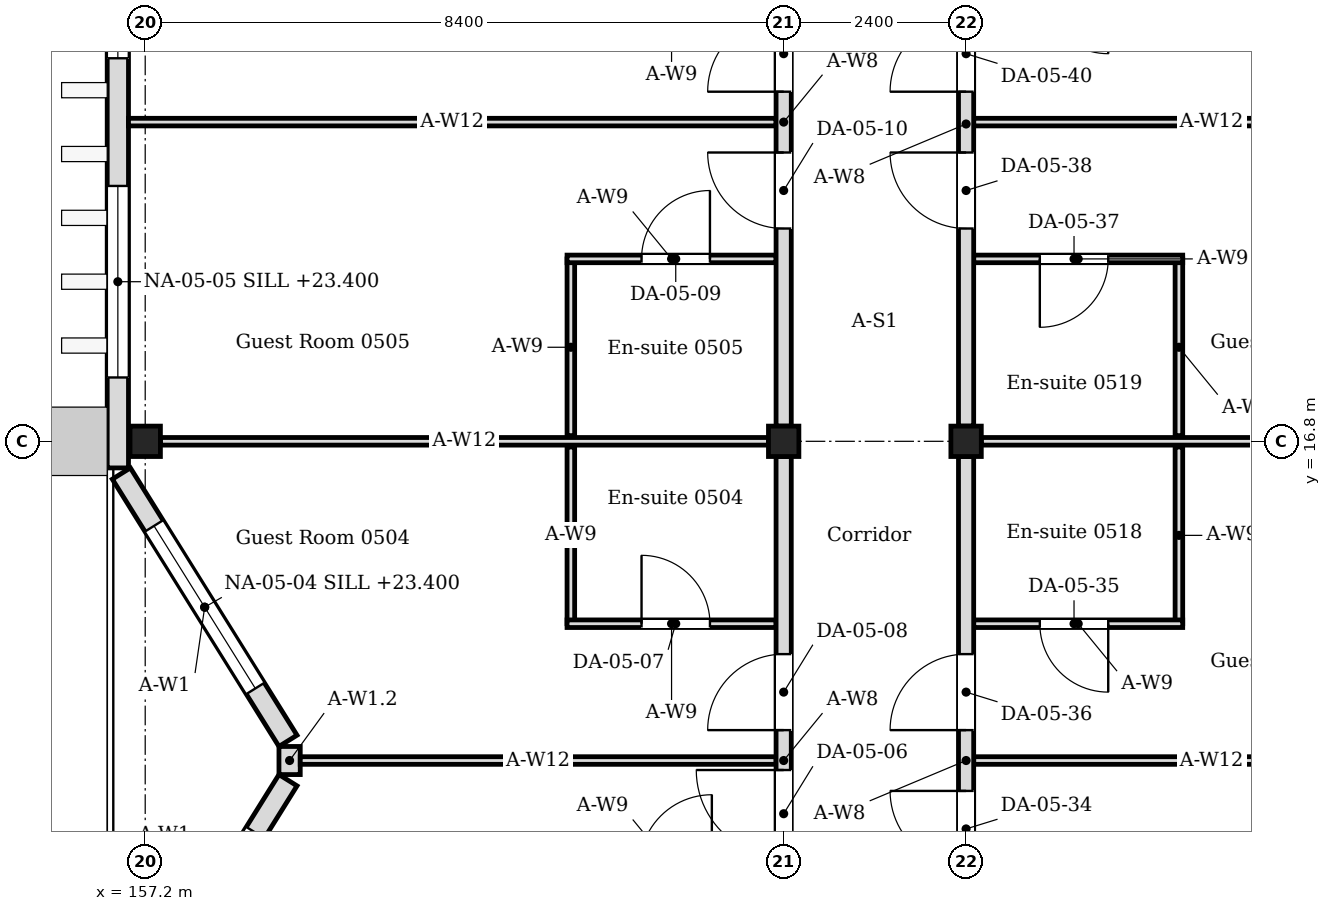
"""IFC4 building model, lengths in metres.
Left out: names, types, materials, properties, quantities, classifications, styles, units other than length and angle.
Written with IfcOpenShell. Run it as: python <this file> out.ifc"""

import sys

from ifc_helpers import new_model, si_unit, direction, frame, frame_2d, origin, origin_2d, place, context, subcontext, project, spatial, rectangle, i_section, extrude, element, fill, save


model = new_model("IFC4")
c1 = context("Model", 3, precision=1e-05, world=origin(), true_north=direction((0.0, 1.0)))
c2 = subcontext(c1, "Body", "Model", "MODEL_VIEW")
j1 = project(units=[si_unit("LENGTHUNIT", "METRE"), si_unit("PLANEANGLEUNIT", "RADIAN")], contexts=[c1])
p1 = place(None, origin())
s1 = spatial("IfcSite", under=j1, at=p1, CompositionType="ELEMENT")
p2 = place(p1, origin())
s2 = spatial("IfcBuilding", under=s1, at=p2, CompositionType="ELEMENT")
p3 = place(p2, frame((0.0, 0.0, 22.8)))
s3 = spatial("IfcBuildingStorey", under=s2, at=p3, CompositionType="ELEMENT", Elevation=22.8)
for number, where, z_axis, x_axis in (
    (1, (157.2, 16.8, 0.0), (0.0, 0.0, 1.0), (1.0, 0.0, 0.0)),
    (2, (165.6, 16.8, 0.0), (0.0, 0.0, 1.0), (1.0, 0.0, 0.0)),
    (3, (168.0, 16.8, 0.0), (0.0, 0.0, 1.0), (1.0, 0.0, 0.0)),
):
    element("IfcColumn", number, at=place(p3, frame(where, z_axis=z_axis, x_axis=x_axis)), inside=s3, PredefinedType="COLUMN", context=c2, shape_type="SweptSolid", body=[
        extrude(i_section(OverallWidth=0.4, OverallDepth=0.4, WebThickness=0.013, FlangeThickness=0.021, FilletRadius=0.022, at=origin_2d()), origin(), (0.0, 0.0, 1.0), 4.2),
    ])
p4 = place(p3, frame((156.886, 8.824, 0.0), z_axis=(0.0, 0.0, 1.0), x_axis=(0.529018946142, 0.848610013271, 0.0)))
e4 = element("IfcWall", 4, at=p4, inside=s3, PredefinedType="SOLIDWALL", context=c2, shape_type="SweptSolid", body=[
    extrude(rectangle(XDim=4.144, YDim=0.28, at=frame_2d((2.072, 0.0))), origin(), (0.0, 0.0, 1.0), 4.05),
])
p5 = place(p4, frame((0.812, 0.0, 0.45)))
e5 = element("IfcOpeningElement", 5, at=p5, cuts=e4, PredefinedType="OPENING", context=c2, shape_type="SweptSolid", body=[
    extrude(rectangle(XDim=2.52, YDim=2.1, at=frame_2d((1.26, 1.05))), frame((0.0, 0.15, 0.0), z_axis=(0.0, -1.0, 0.0), x_axis=(1.0, 0.0, 0.0)), (0.0, 0.0, 1.0), 0.3),
])
p6 = place(p3, frame((159.079, 12.859, 0.0), z_axis=(0.0, 0.0, 1.0), x_axis=(-0.528992500338, 0.848626498871, 0.0)))
e6 = element("IfcWall", 6, at=p6, inside=s3, PredefinedType="SOLIDWALL", context=c2, shape_type="SweptSolid", body=[
    extrude(rectangle(XDim=4.145, YDim=0.28, at=frame_2d((2.072, 0.0))), origin(), (0.0, 0.0, 1.0), 4.05),
])
p7 = place(p6, frame((0.812, 0.0, 0.6)))
e7 = element("IfcOpeningElement", 7, at=p7, cuts=e6, PredefinedType="OPENING", context=c2, shape_type="SweptSolid", body=[
    extrude(rectangle(XDim=2.52, YDim=2.4, at=frame_2d((1.26, 1.2))), frame((0.0, 0.15, 0.0), z_axis=(0.0, -1.0, 0.0), x_axis=(1.0, 0.0, 0.0)), (0.0, 0.0, 1.0), 0.3),
])
p8 = place(p3, frame((159.1, 12.415, 0.0), z_axis=(0.0, 0.0, 1.0), x_axis=(0.0, 1.0, 0.0)))
e8 = element("IfcWall", 8, at=p8, inside=s3, PredefinedType="SOLIDWALL", context=c2, shape_type="SweptSolid", body=[
    extrude(rectangle(XDim=0.37, YDim=0.28, at=frame_2d((0.185, 0.0))), origin(), (0.0, 0.0, 1.0), 3.604),
])
p9 = place(p3, frame((156.84, 16.45, 0.0), z_axis=(0.0, 0.0, 1.0), x_axis=(0.0, 1.0, 0.0)))
e9 = element("IfcWall", 9, at=p9, inside=s3, PredefinedType="SOLIDWALL", context=c2, shape_type="SweptSolid", body=[
    extrude(rectangle(XDim=25.9, YDim=0.28, at=frame_2d((12.95, 0.0))), origin(), (0.0, 0.0, 1.0), 4.05),
])
p10 = place(p9, frame((1.19, 0.0, 0.6)))
e10 = element("IfcOpeningElement", 10, at=p10, cuts=e9, PredefinedType="OPENING", context=c2, shape_type="SweptSolid", body=[
    extrude(rectangle(XDim=2.52, YDim=2.4, at=frame_2d((1.26, 1.2))), frame((0.0, 0.15, 0.0), z_axis=(0.0, -1.0, 0.0), x_axis=(1.0, 0.0, 0.0)), (0.0, 0.0, 1.0), 0.3),
])
p11 = place(p9, frame((5.39, 0.0, 0.6)))
e11 = element("IfcOpeningElement", 11, at=p11, cuts=e9, PredefinedType="OPENING", context=c2, shape_type="SweptSolid", body=[
    extrude(rectangle(XDim=2.52, YDim=2.4, at=frame_2d((1.26, 1.2))), frame((0.0, 0.15, 0.0), z_axis=(0.0, -1.0, 0.0), x_axis=(1.0, 0.0, 0.0)), (0.0, 0.0, 1.0), 0.3),
])
p12 = place(p9, frame((9.17, 0.0, 0.6)))
e12 = element("IfcOpeningElement", 12, at=p12, cuts=e9, PredefinedType="OPENING", context=c2, shape_type="SweptSolid", body=[
    extrude(rectangle(XDim=2.52, YDim=2.4, at=frame_2d((1.26, 1.2))), frame((0.0, 0.15, 0.0), z_axis=(0.0, -1.0, 0.0), x_axis=(1.0, 0.0, 0.0)), (0.0, 0.0, 1.0), 0.3),
])
p13 = place(p9, frame((13.37, 0.0, 0.6)))
e13 = element("IfcOpeningElement", 13, at=p13, cuts=e9, PredefinedType="OPENING", context=c2, shape_type="SweptSolid", body=[
    extrude(rectangle(XDim=2.52, YDim=2.4, at=frame_2d((1.26, 1.2))), frame((0.0, 0.15, 0.0), z_axis=(0.0, -1.0, 0.0), x_axis=(1.0, 0.0, 0.0)), (0.0, 0.0, 1.0), 0.3),
])
p14 = place(p9, frame((17.57, 0.0, 0.6)))
e14 = element("IfcOpeningElement", 14, at=p14, cuts=e9, PredefinedType="OPENING", context=c2, shape_type="SweptSolid", body=[
    extrude(rectangle(XDim=2.52, YDim=2.4, at=frame_2d((1.26, 1.2))), frame((0.0, 0.15, 0.0), z_axis=(0.0, -1.0, 0.0), x_axis=(1.0, 0.0, 0.0)), (0.0, 0.0, 1.0), 0.3),
])
p15 = place(p9, frame((21.77, 0.0, 0.6)))
e15 = element("IfcOpeningElement", 15, at=p15, cuts=e9, PredefinedType="OPENING", context=c2, shape_type="SweptSolid", body=[
    extrude(rectangle(XDim=2.52, YDim=2.4, at=frame_2d((1.26, 1.2))), frame((0.0, 0.15, 0.0), z_axis=(0.0, -1.0, 0.0), x_axis=(1.0, 0.0, 0.0)), (0.0, 0.0, 1.0), 0.3),
])
p16 = place(p3, frame((162.8, 14.4, 0.0), z_axis=(0.0, 0.0, 1.0), x_axis=(0.0, 1.0, 0.0)))
e16 = element("IfcWall", 16, at=p16, inside=s3, PredefinedType="PARTITIONING", context=c2, shape_type="SweptSolid", body=[
    extrude(rectangle(XDim=2.325, YDim=0.1, at=frame_2d((1.163, 0.0))), origin(), (0.0, 0.0, 1.0), 4.05),
])
p17 = place(p3, frame((162.75, 14.4, 0.0), z_axis=(0.0, 0.0, 1.0), x_axis=(1.0, 0.0, 0.0)))
e17 = element("IfcWall", 17, at=p17, inside=s3, PredefinedType="PARTITIONING", context=c2, shape_type="SweptSolid", body=[
    extrude(rectangle(XDim=2.75, YDim=0.1, at=frame_2d((1.375, 0.0))), origin(), (0.0, 0.0, 1.0), 4.05),
])
p18 = place(p17, frame((0.98, 0.0, 0.0)))
e18 = element("IfcOpeningElement", 18, at=p18, cuts=e17, PredefinedType="OPENING", context=c2, shape_type="SweptSolid", body=[
    extrude(rectangle(XDim=0.9, YDim=2.1, at=frame_2d((0.45, 1.05))), frame((0.0, 0.06, 0.0), z_axis=(0.0, -1.0, 0.0), x_axis=(1.0, 0.0, 0.0)), (0.0, 0.0, 1.0), 0.12),
])
p19 = place(p3, frame((162.8, 16.875, 0.0), z_axis=(0.0, 0.0, 1.0), x_axis=(0.0, 1.0, 0.0)))
e19 = element("IfcWall", 19, at=p19, inside=s3, PredefinedType="PARTITIONING", context=c2, shape_type="SweptSolid", body=[
    extrude(rectangle(XDim=2.325, YDim=0.1, at=frame_2d((1.163, 0.0))), origin(), (0.0, 0.0, 1.0), 4.05),
])
p20 = place(p3, frame((162.75, 19.2, 0.0), z_axis=(0.0, 0.0, 1.0), x_axis=(1.0, 0.0, 0.0)))
e20 = element("IfcWall", 20, at=p20, inside=s3, PredefinedType="PARTITIONING", context=c2, shape_type="SweptSolid", body=[
    extrude(rectangle(XDim=2.75, YDim=0.1, at=frame_2d((1.375, 0.0))), origin(), (0.0, 0.0, 1.0), 4.05),
])
p21 = place(p20, frame((0.98, 0.0, 0.0)))
e21 = element("IfcOpeningElement", 21, at=p21, cuts=e20, PredefinedType="OPENING", context=c2, shape_type="SweptSolid", body=[
    extrude(rectangle(XDim=0.9, YDim=2.1, at=frame_2d((0.45, 1.05))), frame((0.0, 0.06, 0.0), z_axis=(0.0, -1.0, 0.0), x_axis=(1.0, 0.0, 0.0)), (0.0, 0.0, 1.0), 0.12),
])
p22 = place(p3, frame((170.8, 14.4, 0.0), z_axis=(0.0, 0.0, 1.0), x_axis=(0.0, 1.0, 0.0)))
e22 = element("IfcWall", 22, at=p22, inside=s3, PredefinedType="PARTITIONING", context=c2, shape_type="SweptSolid", body=[
    extrude(rectangle(XDim=2.325, YDim=0.1, at=frame_2d((1.163, 0.0))), origin(), (0.0, 0.0, 1.0), 4.05),
])
p23 = place(p3, frame((170.85, 14.4, 0.0), z_axis=(0.0, 0.0, 1.0), x_axis=(-1.0, 0.0, 0.0)))
e23 = element("IfcWall", 23, at=p23, inside=s3, PredefinedType="PARTITIONING", context=c2, shape_type="SweptSolid", body=[
    extrude(rectangle(XDim=2.75, YDim=0.1, at=frame_2d((1.375, 0.0))), origin(), (0.0, 0.0, 1.0), 4.05),
])
p24 = place(p23, frame((0.98, 0.0, 0.0)))
e24 = element("IfcOpeningElement", 24, at=p24, cuts=e23, PredefinedType="OPENING", context=c2, shape_type="SweptSolid", body=[
    extrude(rectangle(XDim=0.9, YDim=2.1, at=frame_2d((0.45, 1.05))), frame((0.0, 0.06, 0.0), z_axis=(0.0, -1.0, 0.0), x_axis=(1.0, 0.0, 0.0)), (0.0, 0.0, 1.0), 0.12),
])
p25 = place(p3, frame((170.8, 16.875, 0.0), z_axis=(0.0, 0.0, 1.0), x_axis=(0.0, 1.0, 0.0)))
e25 = element("IfcWall", 25, at=p25, inside=s3, PredefinedType="PARTITIONING", context=c2, shape_type="SweptSolid", body=[
    extrude(rectangle(XDim=2.325, YDim=0.1, at=frame_2d((1.163, 0.0))), origin(), (0.0, 0.0, 1.0), 4.05),
])
p26 = place(p3, frame((170.85, 19.2, 0.0), z_axis=(0.0, 0.0, 1.0), x_axis=(-1.0, 0.0, 0.0)))
e26 = element("IfcWall", 26, at=p26, inside=s3, PredefinedType="PARTITIONING", context=c2, shape_type="SweptSolid", body=[
    extrude(rectangle(XDim=2.75, YDim=0.1, at=frame_2d((1.375, 0.0))), origin(), (0.0, 0.0, 1.0), 4.05),
])
p27 = place(p26, frame((0.98, 0.0, 0.0)))
e27 = element("IfcOpeningElement", 27, at=p27, cuts=e26, PredefinedType="OPENING", context=c2, shape_type="SweptSolid", body=[
    extrude(rectangle(XDim=0.9, YDim=2.1, at=frame_2d((0.45, 1.05))), frame((0.0, 0.06, 0.0), z_axis=(0.0, -1.0, 0.0), x_axis=(1.0, 0.0, 0.0)), (0.0, 0.0, 1.0), 0.12),
])
for number, where, z_axis, x_axis in (
    (28, (157.4, 16.8, 0.0), (0.0, 0.0, 1.0), (1.0, 0.0, 0.0)),
    (29, (168.2, 16.8, 0.0), (0.0, 0.0, 1.0), (1.0, 0.0, 0.0)),
):
    element("IfcWall", number, at=place(p3, frame(where, z_axis=z_axis, x_axis=x_axis)), inside=s3, PredefinedType="PARTITIONING", context=c2, shape_type="SweptSolid", body=[
        extrude(rectangle(XDim=8.0, YDim=0.1, at=frame_2d((4.0, 0.0))), origin(), (0.0, 0.0, 1.0), 3.604),
    ])
p28 = place(p3, frame((159.24, 12.6, 0.0), z_axis=(0.0, 0.0, 1.0), x_axis=(1.0, 0.0, 0.0)))
e30 = element("IfcWall", 30, at=p28, inside=s3, PredefinedType="PARTITIONING", context=c2, shape_type="SweptSolid", body=[
    extrude(rectangle(XDim=6.26, YDim=0.1, at=frame_2d((3.13, 0.0))), origin(), (0.0, 0.0, 1.0), 3.604),
])
p29 = place(p3, frame((156.98, 21.0, 0.0), z_axis=(0.0, 0.0, 1.0), x_axis=(1.0, 0.0, 0.0)))
e31 = element("IfcWall", 31, at=p29, inside=s3, PredefinedType="PARTITIONING", context=c2, shape_type="SweptSolid", body=[
    extrude(rectangle(XDim=8.52, YDim=0.1, at=frame_2d((4.26, 0.0))), origin(), (0.0, 0.0, 1.0), 3.604),
])
for number, where, z_axis, x_axis in (
    (32, (168.1, 12.6, 0.0), (0.0, 0.0, 1.0), (1.0, 0.0, 0.0)),
    (33, (168.1, 21.0, 0.0), (0.0, 0.0, 1.0), (1.0, 0.0, 0.0)),
):
    element("IfcWall", number, at=place(p3, frame(where, z_axis=z_axis, x_axis=x_axis)), inside=s3, PredefinedType="PARTITIONING", context=c2, shape_type="SweptSolid", body=[
        extrude(rectangle(XDim=6.26, YDim=0.1, at=frame_2d((3.13, 0.0))), origin(), (0.0, 0.0, 1.0), 3.604),
    ])
p30 = place(p3, frame((165.6, 8.6, 0.0), z_axis=(0.0, 0.0, 1.0), x_axis=(0.0, 1.0, 0.0)))
e34 = element("IfcWall", 34, at=p30, inside=s3, PredefinedType="PARTITIONING", context=c2, shape_type="SweptSolid", body=[
    extrude(rectangle(XDim=8.0, YDim=0.2, at=frame_2d((4.0, 0.0))), origin(), (0.0, 0.0, 1.0), 3.45),
])
p31 = place(p30, frame((2.725, 0.0, 0.0)))
e35 = element("IfcOpeningElement", 35, at=p31, cuts=e34, PredefinedType="OPENING", context=c2, shape_type="SweptSolid", body=[
    extrude(rectangle(XDim=1.15, YDim=2.1, at=frame_2d((0.575, 1.05))), frame((0.0, 0.11, 0.0), z_axis=(0.0, -1.0, 0.0), x_axis=(1.0, 0.0, 0.0)), (0.0, 0.0, 1.0), 0.22),
])
p32 = place(p30, frame((4.4, 0.0, 0.0)))
e36 = element("IfcOpeningElement", 36, at=p32, cuts=e34, PredefinedType="OPENING", context=c2, shape_type="SweptSolid", body=[
    extrude(rectangle(XDim=1.0, YDim=2.4, at=frame_2d((0.5, 1.2))), frame((0.0, 0.11, 0.0), z_axis=(0.0, -1.0, 0.0), x_axis=(1.0, 0.0, 0.0)), (0.0, 0.0, 1.0), 0.22),
])
p33 = place(p3, frame((165.6, 17.0, 0.0), z_axis=(0.0, 0.0, 1.0), x_axis=(0.0, 1.0, 0.0)))
e37 = element("IfcWall", 37, at=p33, inside=s3, PredefinedType="PARTITIONING", context=c2, shape_type="SweptSolid", body=[
    extrude(rectangle(XDim=8.0, YDim=0.2, at=frame_2d((4.0, 0.0))), origin(), (0.0, 0.0, 1.0), 3.45),
])
p34 = place(p33, frame((2.6, 0.0, 0.0)))
e38 = element("IfcOpeningElement", 38, at=p34, cuts=e37, PredefinedType="OPENING", context=c2, shape_type="SweptSolid", body=[
    extrude(rectangle(XDim=1.0, YDim=2.4, at=frame_2d((0.5, 1.2))), frame((0.0, 0.11, 0.0), z_axis=(0.0, -1.0, 0.0), x_axis=(1.0, 0.0, 0.0)), (0.0, 0.0, 1.0), 0.22),
])
p35 = place(p33, frame((4.4, 0.0, 0.0)))
e39 = element("IfcOpeningElement", 39, at=p35, cuts=e37, PredefinedType="OPENING", context=c2, shape_type="SweptSolid", body=[
    extrude(rectangle(XDim=1.0, YDim=2.4, at=frame_2d((0.5, 1.2))), frame((0.0, 0.11, 0.0), z_axis=(0.0, -1.0, 0.0), x_axis=(1.0, 0.0, 0.0)), (0.0, 0.0, 1.0), 0.22),
])
p36 = place(p3, frame((168.0, 8.6, 0.0), z_axis=(0.0, 0.0, 1.0), x_axis=(0.0, 1.0, 0.0)))
e40 = element("IfcWall", 40, at=p36, inside=s3, PredefinedType="PARTITIONING", context=c2, shape_type="SweptSolid", body=[
    extrude(rectangle(XDim=8.0, YDim=0.2, at=frame_2d((4.0, 0.0))), origin(), (0.0, 0.0, 1.0), 3.45),
])
p37 = place(p36, frame((2.6, 0.0, 0.0)))
e41 = element("IfcOpeningElement", 41, at=p37, cuts=e40, PredefinedType="OPENING", context=c2, shape_type="SweptSolid", body=[
    extrude(rectangle(XDim=1.0, YDim=2.4, at=frame_2d((0.5, 1.2))), frame((0.0, 0.11, 0.0), z_axis=(0.0, -1.0, 0.0), x_axis=(1.0, 0.0, 0.0)), (0.0, 0.0, 1.0), 0.22),
])
p38 = place(p36, frame((4.4, 0.0, 0.0)))
e42 = element("IfcOpeningElement", 42, at=p38, cuts=e40, PredefinedType="OPENING", context=c2, shape_type="SweptSolid", body=[
    extrude(rectangle(XDim=1.0, YDim=2.4, at=frame_2d((0.5, 1.2))), frame((0.0, 0.11, 0.0), z_axis=(0.0, -1.0, 0.0), x_axis=(1.0, 0.0, 0.0)), (0.0, 0.0, 1.0), 0.22),
])
p39 = place(p3, frame((168.0, 17.0, 0.0), z_axis=(0.0, 0.0, 1.0), x_axis=(0.0, 1.0, 0.0)))
e43 = element("IfcWall", 43, at=p39, inside=s3, PredefinedType="PARTITIONING", context=c2, shape_type="SweptSolid", body=[
    extrude(rectangle(XDim=7.95, YDim=0.2, at=frame_2d((3.975, 0.0))), origin(), (0.0, 0.0, 1.0), 3.45),
])
p40 = place(p39, frame((2.6, 0.0, 0.0)))
e44 = element("IfcOpeningElement", 44, at=p40, cuts=e43, PredefinedType="OPENING", context=c2, shape_type="SweptSolid", body=[
    extrude(rectangle(XDim=1.0, YDim=2.4, at=frame_2d((0.5, 1.2))), frame((0.0, 0.11, 0.0), z_axis=(0.0, -1.0, 0.0), x_axis=(1.0, 0.0, 0.0)), (0.0, 0.0, 1.0), 0.22),
])
p41 = place(p39, frame((4.4, 0.0, 0.0)))
e45 = element("IfcOpeningElement", 45, at=p41, cuts=e43, PredefinedType="OPENING", context=c2, shape_type="SweptSolid", body=[
    extrude(rectangle(XDim=1.0, YDim=2.4, at=frame_2d((0.5, 1.2))), frame((0.0, 0.11, 0.0), z_axis=(0.0, -1.0, 0.0), x_axis=(1.0, 0.0, 0.0)), (0.0, 0.0, 1.0), 0.22),
])
p42 = place(p7, origin())
e46 = element("IfcWindow", 46, at=p42, inside=s3, PartitioningType="SINGLE_PANEL", PredefinedType="WINDOW", context=c2, shape_type="SweptSolid", body=[
    extrude(rectangle(XDim=2.52, YDim=2.4, at=frame_2d((1.26, 1.2))), frame((0.0, 0.03, 0.0), z_axis=(0.0, -1.0, 0.0), x_axis=(1.0, 0.0, 0.0)), (0.0, 0.0, 1.0), 0.06),
])
fill(e7, e46)
p43 = place(p10, origin())
e47 = element("IfcWindow", 47, at=p43, inside=s3, PartitioningType="SINGLE_PANEL", PredefinedType="WINDOW", context=c2, shape_type="SweptSolid", body=[
    extrude(rectangle(XDim=2.52, YDim=2.4, at=frame_2d((1.26, 1.2))), frame((0.0, 0.03, 0.0), z_axis=(0.0, -1.0, 0.0), x_axis=(1.0, 0.0, 0.0)), (0.0, 0.0, 1.0), 0.06),
])
fill(e10, e47)
p44 = place(p11, origin())
e48 = element("IfcWindow", 48, at=p44, inside=s3, PartitioningType="SINGLE_PANEL", PredefinedType="WINDOW", context=c2, shape_type="SweptSolid", body=[
    extrude(rectangle(XDim=2.52, YDim=2.4, at=frame_2d((1.26, 1.2))), frame((0.0, 0.03, 0.0), z_axis=(0.0, -1.0, 0.0), x_axis=(1.0, 0.0, 0.0)), (0.0, 0.0, 1.0), 0.06),
])
fill(e11, e48)
p45 = place(p31, origin())
e49 = element("IfcDoor", 49, at=p45, inside=s3, OperationType="SINGLE_SWING_RIGHT", PredefinedType="DOOR", context=c2, shape_type="SweptSolid", body=[
    extrude(rectangle(XDim=1.15, YDim=2.1, at=frame_2d((0.575, 1.05))), frame((0.0, 0.025, 0.0), z_axis=(0.0, -1.0, 0.0), x_axis=(1.0, 0.0, 0.0)), (0.0, 0.0, 1.0), 0.05),
])
fill(e35, e49)
p46 = place(p18, origin())
e50 = element("IfcDoor", 50, at=p46, inside=s3, OperationType="SINGLE_SWING_LEFT", PredefinedType="DOOR", context=c2, shape_type="SweptSolid", body=[
    extrude(rectangle(XDim=0.9, YDim=2.1, at=frame_2d((0.45, 1.05))), frame((0.0, 0.025, 0.0), z_axis=(0.0, -1.0, 0.0), x_axis=(1.0, 0.0, 0.0)), (0.0, 0.0, 1.0), 0.05),
])
fill(e18, e50)
p47 = place(p32, origin())
e51 = element("IfcDoor", 51, at=p47, inside=s3, OperationType="SINGLE_SWING_LEFT", PredefinedType="DOOR", context=c2, shape_type="SweptSolid", body=[
    extrude(rectangle(XDim=1.0, YDim=2.4, at=frame_2d((0.5, 1.2))), frame((0.0, 0.025, 0.0), z_axis=(0.0, -1.0, 0.0), x_axis=(1.0, 0.0, 0.0)), (0.0, 0.0, 1.0), 0.05),
])
fill(e36, e51)
p48 = place(p21, origin())
e52 = element("IfcDoor", 52, at=p48, inside=s3, OperationType="SINGLE_SWING_RIGHT", PredefinedType="DOOR", context=c2, shape_type="SweptSolid", body=[
    extrude(rectangle(XDim=0.9, YDim=2.1, at=frame_2d((0.45, 1.05))), frame((0.0, 0.025, 0.0), z_axis=(0.0, -1.0, 0.0), x_axis=(1.0, 0.0, 0.0)), (0.0, 0.0, 1.0), 0.05),
])
fill(e21, e52)
p49 = place(p34, origin())
e53 = element("IfcDoor", 53, at=p49, inside=s3, OperationType="SINGLE_SWING_RIGHT", PredefinedType="DOOR", context=c2, shape_type="SweptSolid", body=[
    extrude(rectangle(XDim=1.0, YDim=2.4, at=frame_2d((0.5, 1.2))), frame((0.0, 0.025, 0.0), z_axis=(0.0, -1.0, 0.0), x_axis=(1.0, 0.0, 0.0)), (0.0, 0.0, 1.0), 0.05),
])
fill(e38, e53)
p50 = place(p35, origin())
e54 = element("IfcDoor", 54, at=p50, inside=s3, OperationType="SINGLE_SWING_LEFT", PredefinedType="DOOR", context=c2, shape_type="SweptSolid", body=[
    extrude(rectangle(XDim=1.0, YDim=2.4, at=frame_2d((0.5, 1.2))), frame((0.0, 0.025, 0.0), z_axis=(0.0, -1.0, 0.0), x_axis=(1.0, 0.0, 0.0)), (0.0, 0.0, 1.0), 0.05),
])
fill(e39, e54)
p51 = place(p37, origin())
e55 = element("IfcDoor", 55, at=p51, inside=s3, OperationType="SINGLE_SWING_RIGHT", PredefinedType="DOOR", context=c2, shape_type="SweptSolid", body=[
    extrude(rectangle(XDim=1.0, YDim=2.4, at=frame_2d((0.5, 1.2))), frame((0.0, 0.025, 0.0), z_axis=(0.0, -1.0, 0.0), x_axis=(1.0, 0.0, 0.0)), (0.0, 0.0, 1.0), 0.05),
])
fill(e41, e55)
p52 = place(p24, origin())
e56 = element("IfcDoor", 56, at=p52, inside=s3, OperationType="SINGLE_SWING_LEFT", PredefinedType="DOOR", context=c2, shape_type="SweptSolid", body=[
    extrude(rectangle(XDim=0.9, YDim=2.1, at=frame_2d((0.45, 1.05))), frame((0.0, 0.025, 0.0), z_axis=(0.0, -1.0, 0.0), x_axis=(1.0, 0.0, 0.0)), (0.0, 0.0, 1.0), 0.05),
])
fill(e24, e56)
p53 = place(p38, origin())
e57 = element("IfcDoor", 57, at=p53, inside=s3, OperationType="SINGLE_SWING_LEFT", PredefinedType="DOOR", context=c2, shape_type="SweptSolid", body=[
    extrude(rectangle(XDim=1.0, YDim=2.4, at=frame_2d((0.5, 1.2))), frame((0.0, 0.025, 0.0), z_axis=(0.0, -1.0, 0.0), x_axis=(1.0, 0.0, 0.0)), (0.0, 0.0, 1.0), 0.05),
])
fill(e42, e57)
p54 = place(p27, origin())
e58 = element("IfcDoor", 58, at=p54, inside=s3, OperationType="SINGLE_SWING_RIGHT", PredefinedType="DOOR", context=c2, shape_type="SweptSolid", body=[
    extrude(rectangle(XDim=0.9, YDim=2.1, at=frame_2d((0.45, 1.05))), frame((0.0, 0.025, 0.0), z_axis=(0.0, -1.0, 0.0), x_axis=(1.0, 0.0, 0.0)), (0.0, 0.0, 1.0), 0.05),
])
fill(e27, e58)
p55 = place(p40, origin())
e59 = element("IfcDoor", 59, at=p55, inside=s3, OperationType="SINGLE_SWING_RIGHT", PredefinedType="DOOR", context=c2, shape_type="SweptSolid", body=[
    extrude(rectangle(XDim=1.0, YDim=2.4, at=frame_2d((0.5, 1.2))), frame((0.0, 0.025, 0.0), z_axis=(0.0, -1.0, 0.0), x_axis=(1.0, 0.0, 0.0)), (0.0, 0.0, 1.0), 0.05),
])
fill(e44, e59)
p56 = place(p41, origin())
e60 = element("IfcDoor", 60, at=p56, inside=s3, OperationType="SINGLE_SWING_LEFT", PredefinedType="DOOR", context=c2, shape_type="SweptSolid", body=[
    extrude(rectangle(XDim=1.0, YDim=2.4, at=frame_2d((0.5, 1.2))), frame((0.0, 0.025, 0.0), z_axis=(0.0, -1.0, 0.0), x_axis=(1.0, 0.0, 0.0)), (0.0, 0.0, 1.0), 0.05),
])
fill(e45, e60)
save(model, sys.argv[1])
